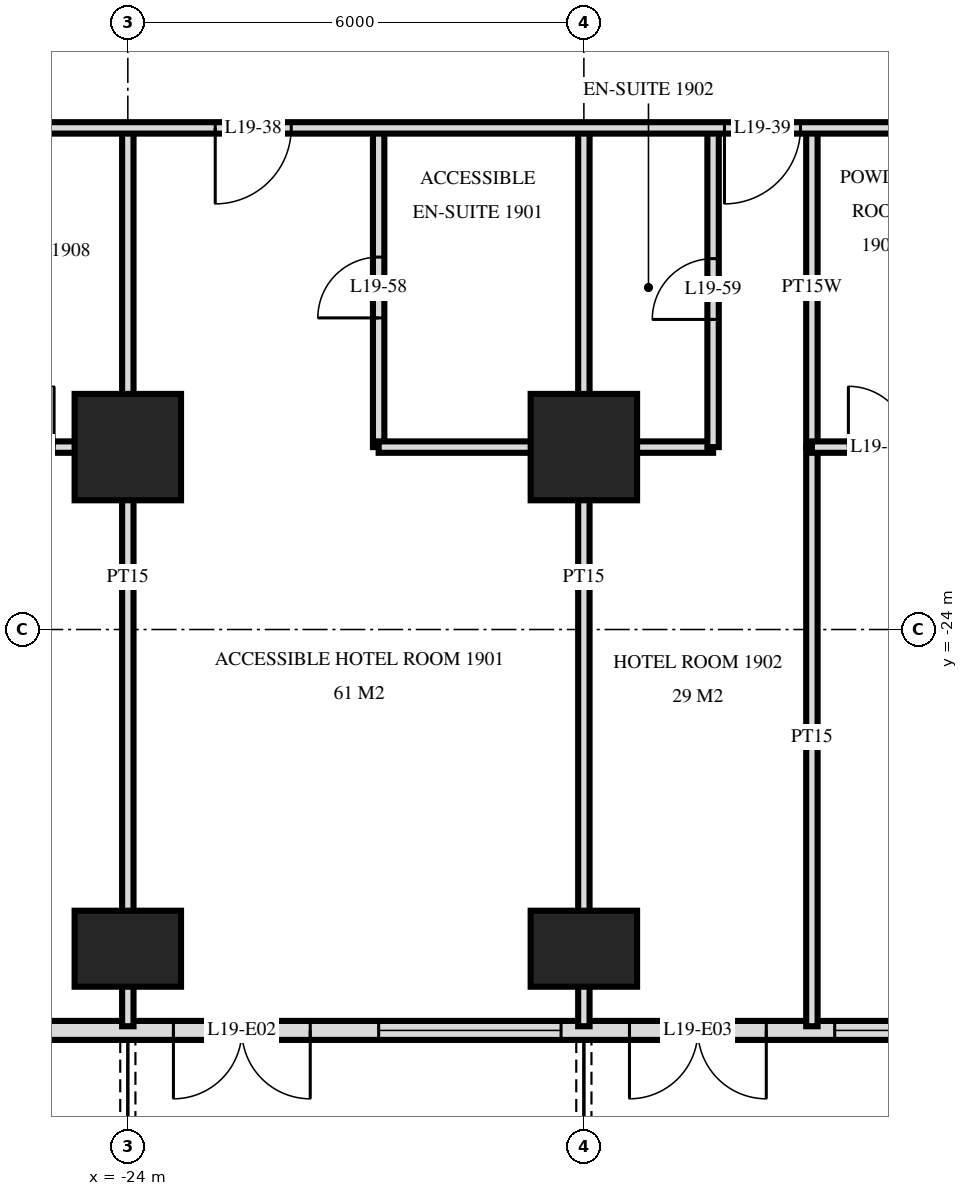
"""IFC4 building model, lengths in metres.
Left out: names, types, materials, properties, quantities, classifications, styles, units other than length and angle.
Written with IfcOpenShell. Run it as: python <this file> out.ifc"""

import sys

from ifc_helpers import new_model, si_unit, direction, frame, frame_2d, origin, origin_2d, place, context, subcontext, project, spatial, rectangle, extrude, element, fill, save


model = new_model("IFC4")
c1 = context("Model", 3, precision=1e-05, world=origin(), true_north=direction((0.0, 1.0)))
c2 = subcontext(c1, "Body", "Model", "MODEL_VIEW")
j1 = project(units=[si_unit("LENGTHUNIT", "METRE"), si_unit("PLANEANGLEUNIT", "RADIAN")], contexts=[c1])
p1 = place(None, origin())
s1 = spatial("IfcSite", under=j1, at=p1, CompositionType="ELEMENT")
p2 = place(p1, origin())
s2 = spatial("IfcBuilding", under=s1, at=p2, CompositionType="ELEMENT")
p3 = place(p2, frame((0.0, 0.0, 78.0)))
s3 = spatial("IfcBuildingStorey", under=s2, at=p3, CompositionType="ELEMENT", Elevation=78.0)
p4 = place(p3, frame((-24.0, -28.2, 0.0), z_axis=(0.0, 0.0, 1.0), x_axis=(1.0, 0.0, 0.0)))
e1 = element("IfcColumn", 1, at=p4, inside=s3, PredefinedType="COLUMN", context=c2, shape_type="SweptSolid", body=[
    extrude(rectangle(XDim=1.4, YDim=1.0, at=origin_2d()), origin(), (0.0, 0.0, 1.0), 3.6),
])
p5 = place(p3, frame((-24.0, -21.6, 0.0), z_axis=(0.0, 0.0, 1.0), x_axis=(1.0, 0.0, 0.0)))
e2 = element("IfcColumn", 2, at=p5, inside=s3, PredefinedType="COLUMN", context=c2, shape_type="SweptSolid", body=[
    extrude(rectangle(XDim=1.4, YDim=1.4, at=origin_2d()), origin(), (0.0, 0.0, 1.0), 3.6),
])
p6 = place(p3, frame((-18.0, -28.2, 0.0), z_axis=(0.0, 0.0, 1.0), x_axis=(1.0, 0.0, 0.0)))
e3 = element("IfcColumn", 3, at=p6, inside=s3, PredefinedType="COLUMN", context=c2, shape_type="SweptSolid", body=[
    extrude(rectangle(XDim=1.4, YDim=1.0, at=origin_2d()), origin(), (0.0, 0.0, 1.0), 3.6),
])
p7 = place(p3, frame((-18.0, -21.6, 0.0), z_axis=(0.0, 0.0, 1.0), x_axis=(1.0, 0.0, 0.0)))
e4 = element("IfcColumn", 4, at=p7, inside=s3, PredefinedType="COLUMN", context=c2, shape_type="SweptSolid", body=[
    extrude(rectangle(XDim=1.4, YDim=1.4, at=origin_2d()), origin(), (0.0, 0.0, 1.0), 3.6),
])
p8 = place(p3, frame((-28.775, -29.275, 0.0), z_axis=(0.0, 0.0, 1.0), x_axis=(1.0, 0.0, 0.0)))
e5 = element("IfcWall", 5, at=p8, inside=s3, PredefinedType="SOLIDWALL", context=c2, shape_type="SweptSolid", body=[
    extrude(rectangle(XDim=57.551, YDim=0.25, at=frame_2d((28.775, 0.0))), origin(), (0.0, 0.0, 1.0), 3.32),
])
p9 = place(p8, frame((0.575, 0.0, 0.0)))
e6 = element("IfcOpeningElement", 6, at=p9, cuts=e5, PredefinedType="OPENING", context=c2, shape_type="SweptSolid", body=[
    extrude(rectangle(XDim=1.8, YDim=2.4, at=frame_2d((0.9, 1.2))), frame((0.0, 0.135, 0.0), z_axis=(0.0, -1.0, 0.0), x_axis=(1.0, 0.0, 0.0)), (0.0, 0.0, 1.0), 0.27),
])
p10 = place(p8, frame((5.375, 0.0, 0.0)))
e7 = element("IfcOpeningElement", 7, at=p10, cuts=e5, PredefinedType="OPENING", context=c2, shape_type="SweptSolid", body=[
    extrude(rectangle(XDim=1.8, YDim=2.4, at=frame_2d((0.9, 1.2))), frame((0.0, 0.135, 0.0), z_axis=(0.0, -1.0, 0.0), x_axis=(1.0, 0.0, 0.0)), (0.0, 0.0, 1.0), 0.27),
])
p11 = place(p8, frame((8.075, 0.0, 0.3)))
e8 = element("IfcOpeningElement", 8, at=p11, cuts=e5, PredefinedType="OPENING", context=c2, shape_type="SweptSolid", body=[
    extrude(rectangle(XDim=2.4, YDim=2.1, at=frame_2d((1.2, 1.05))), frame((0.0, 0.135, 0.0), z_axis=(0.0, -1.0, 0.0), x_axis=(1.0, 0.0, 0.0)), (0.0, 0.0, 1.0), 0.27),
])
p12 = place(p8, frame((11.375, 0.0, 0.0)))
e9 = element("IfcOpeningElement", 9, at=p12, cuts=e5, PredefinedType="OPENING", context=c2, shape_type="SweptSolid", body=[
    extrude(rectangle(XDim=1.8, YDim=2.4, at=frame_2d((0.9, 1.2))), frame((0.0, 0.135, 0.0), z_axis=(0.0, -1.0, 0.0), x_axis=(1.0, 0.0, 0.0)), (0.0, 0.0, 1.0), 0.27),
])
p13 = place(p8, frame((14.075, 0.0, 0.3)))
e10 = element("IfcOpeningElement", 10, at=p13, cuts=e5, PredefinedType="OPENING", context=c2, shape_type="SweptSolid", body=[
    extrude(rectangle(XDim=2.4, YDim=2.1, at=frame_2d((1.2, 1.05))), frame((0.0, 0.135, 0.0), z_axis=(0.0, -1.0, 0.0), x_axis=(1.0, 0.0, 0.0)), (0.0, 0.0, 1.0), 0.27),
])
p14 = place(p8, frame((17.075, 0.0, 0.3)))
e11 = element("IfcOpeningElement", 11, at=p14, cuts=e5, PredefinedType="OPENING", context=c2, shape_type="SweptSolid", body=[
    extrude(rectangle(XDim=2.4, YDim=2.1, at=frame_2d((1.2, 1.05))), frame((0.0, 0.135, 0.0), z_axis=(0.0, -1.0, 0.0), x_axis=(1.0, 0.0, 0.0)), (0.0, 0.0, 1.0), 0.27),
])
p15 = place(p8, frame((20.375, 0.0, 0.0)))
e12 = element("IfcOpeningElement", 12, at=p15, cuts=e5, PredefinedType="OPENING", context=c2, shape_type="SweptSolid", body=[
    extrude(rectangle(XDim=1.8, YDim=2.4, at=frame_2d((0.9, 1.2))), frame((0.0, 0.135, 0.0), z_axis=(0.0, -1.0, 0.0), x_axis=(1.0, 0.0, 0.0)), (0.0, 0.0, 1.0), 0.27),
])
p16 = place(p8, frame((23.375, 0.0, 0.0)))
e13 = element("IfcOpeningElement", 13, at=p16, cuts=e5, PredefinedType="OPENING", context=c2, shape_type="SweptSolid", body=[
    extrude(rectangle(XDim=1.8, YDim=2.4, at=frame_2d((0.9, 1.2))), frame((0.0, 0.135, 0.0), z_axis=(0.0, -1.0, 0.0), x_axis=(1.0, 0.0, 0.0)), (0.0, 0.0, 1.0), 0.27),
])
p17 = place(p8, frame((26.075, 0.0, 0.3)))
e14 = element("IfcOpeningElement", 14, at=p17, cuts=e5, PredefinedType="OPENING", context=c2, shape_type="SweptSolid", body=[
    extrude(rectangle(XDim=2.4, YDim=2.1, at=frame_2d((1.2, 1.05))), frame((0.0, 0.135, 0.0), z_axis=(0.0, -1.0, 0.0), x_axis=(1.0, 0.0, 0.0)), (0.0, 0.0, 1.0), 0.27),
])
p18 = place(p8, frame((29.375, 0.0, 0.0)))
e15 = element("IfcOpeningElement", 15, at=p18, cuts=e5, PredefinedType="OPENING", context=c2, shape_type="SweptSolid", body=[
    extrude(rectangle(XDim=1.8, YDim=2.4, at=frame_2d((0.9, 1.2))), frame((0.0, 0.135, 0.0), z_axis=(0.0, -1.0, 0.0), x_axis=(1.0, 0.0, 0.0)), (0.0, 0.0, 1.0), 0.27),
])
p19 = place(p8, frame((32.075, 0.0, 0.3)))
e16 = element("IfcOpeningElement", 16, at=p19, cuts=e5, PredefinedType="OPENING", context=c2, shape_type="SweptSolid", body=[
    extrude(rectangle(XDim=2.4, YDim=2.1, at=frame_2d((1.2, 1.05))), frame((0.0, 0.135, 0.0), z_axis=(0.0, -1.0, 0.0), x_axis=(1.0, 0.0, 0.0)), (0.0, 0.0, 1.0), 0.27),
])
p20 = place(p8, frame((35.375, 0.0, 0.0)))
e17 = element("IfcOpeningElement", 17, at=p20, cuts=e5, PredefinedType="OPENING", context=c2, shape_type="SweptSolid", body=[
    extrude(rectangle(XDim=1.8, YDim=2.4, at=frame_2d((0.9, 1.2))), frame((0.0, 0.135, 0.0), z_axis=(0.0, -1.0, 0.0), x_axis=(1.0, 0.0, 0.0)), (0.0, 0.0, 1.0), 0.27),
])
p21 = place(p8, frame((38.075, 0.0, 0.3)))
e18 = element("IfcOpeningElement", 18, at=p21, cuts=e5, PredefinedType="OPENING", context=c2, shape_type="SweptSolid", body=[
    extrude(rectangle(XDim=2.4, YDim=2.1, at=frame_2d((1.2, 1.05))), frame((0.0, 0.135, 0.0), z_axis=(0.0, -1.0, 0.0), x_axis=(1.0, 0.0, 0.0)), (0.0, 0.0, 1.0), 0.27),
])
p22 = place(p8, frame((41.375, 0.0, 0.0)))
e19 = element("IfcOpeningElement", 19, at=p22, cuts=e5, PredefinedType="OPENING", context=c2, shape_type="SweptSolid", body=[
    extrude(rectangle(XDim=1.8, YDim=2.4, at=frame_2d((0.9, 1.2))), frame((0.0, 0.135, 0.0), z_axis=(0.0, -1.0, 0.0), x_axis=(1.0, 0.0, 0.0)), (0.0, 0.0, 1.0), 0.27),
])
p23 = place(p8, frame((44.075, 0.0, 0.3)))
e20 = element("IfcOpeningElement", 20, at=p23, cuts=e5, PredefinedType="OPENING", context=c2, shape_type="SweptSolid", body=[
    extrude(rectangle(XDim=2.4, YDim=2.1, at=frame_2d((1.2, 1.05))), frame((0.0, 0.135, 0.0), z_axis=(0.0, -1.0, 0.0), x_axis=(1.0, 0.0, 0.0)), (0.0, 0.0, 1.0), 0.27),
])
p24 = place(p8, frame((47.075, 0.0, 0.3)))
e21 = element("IfcOpeningElement", 21, at=p24, cuts=e5, PredefinedType="OPENING", context=c2, shape_type="SweptSolid", body=[
    extrude(rectangle(XDim=2.4, YDim=2.1, at=frame_2d((1.2, 1.05))), frame((0.0, 0.135, 0.0), z_axis=(0.0, -1.0, 0.0), x_axis=(1.0, 0.0, 0.0)), (0.0, 0.0, 1.0), 0.27),
])
p25 = place(p8, frame((50.375, 0.0, 0.0)))
e22 = element("IfcOpeningElement", 22, at=p25, cuts=e5, PredefinedType="OPENING", context=c2, shape_type="SweptSolid", body=[
    extrude(rectangle(XDim=1.8, YDim=2.4, at=frame_2d((0.9, 1.2))), frame((0.0, 0.135, 0.0), z_axis=(0.0, -1.0, 0.0), x_axis=(1.0, 0.0, 0.0)), (0.0, 0.0, 1.0), 0.27),
])
p26 = place(p8, frame((53.375, 0.0, 0.0)))
e23 = element("IfcOpeningElement", 23, at=p26, cuts=e5, PredefinedType="OPENING", context=c2, shape_type="SweptSolid", body=[
    extrude(rectangle(XDim=1.8, YDim=2.4, at=frame_2d((0.9, 1.2))), frame((0.0, 0.135, 0.0), z_axis=(0.0, -1.0, 0.0), x_axis=(1.0, 0.0, 0.0)), (0.0, 0.0, 1.0), 0.27),
])
p27 = place(p3, frame((-15.0, -29.22, 0.0), z_axis=(0.0, 0.0, 1.0), x_axis=(0.0, 1.0, 0.0)))
e24 = element("IfcWall", 24, at=p27, inside=s3, PredefinedType="PARTITIONING", context=c2, shape_type="SweptSolid", body=[
    extrude(rectangle(XDim=7.62, YDim=0.15, at=frame_2d((3.81, 0.0))), origin(), (0.0, 0.0, 1.0), 3.32),
])
p28 = place(p3, frame((-15.0, -21.6, 0.0), z_axis=(0.0, 0.0, 1.0), x_axis=(0.0, 1.0, 0.0)))
e25 = element("IfcWall", 25, at=p28, inside=s3, PredefinedType="PLUMBINGWALL", context=c2, shape_type="SweptSolid", body=[
    extrude(rectangle(XDim=4.2, YDim=0.15, at=frame_2d((2.1, 0.0))), origin(), (0.0, 0.0, 1.0), 3.32),
])
p29 = place(p3, frame((-16.3, -21.6, 0.0), z_axis=(0.0, 0.0, 1.0), x_axis=(0.0, 1.0, 0.0)))
e26 = element("IfcWall", 26, at=p29, inside=s3, PredefinedType="PARTITIONING", context=c2, shape_type="SweptSolid", body=[
    extrude(rectangle(XDim=4.2, YDim=0.15, at=frame_2d((2.1, 0.0))), origin(), (0.0, 0.0, 1.0), 3.32),
])
p30 = place(p29, frame((1.68, 0.0, 0.0)))
e27 = element("IfcOpeningElement", 27, at=p30, cuts=e26, PredefinedType="OPENING", context=c2, shape_type="SweptSolid", body=[
    extrude(rectangle(XDim=0.8, YDim=2.1, at=frame_2d((0.4, 1.05))), frame((0.0, 0.085, 0.0), z_axis=(0.0, -1.0, 0.0), x_axis=(1.0, 0.0, 0.0)), (0.0, 0.0, 1.0), 0.17),
])
p31 = place(p3, frame((-18.0, -29.22, 0.0), z_axis=(0.0, 0.0, 1.0), x_axis=(0.0, 1.0, 0.0)))
e28 = element("IfcWall", 28, at=p31, inside=s3, PredefinedType="PARTITIONING", context=c2, shape_type="SweptSolid", body=[
    extrude(rectangle(XDim=11.82, YDim=0.15, at=frame_2d((5.91, 0.0))), origin(), (0.0, 0.0, 1.0), 3.32),
])
p32 = place(p3, frame((-20.7, -21.6, 0.0), z_axis=(0.0, 0.0, 1.0), x_axis=(0.0, 1.0, 0.0)))
e29 = element("IfcWall", 29, at=p32, inside=s3, PredefinedType="PARTITIONING", context=c2, shape_type="SweptSolid", body=[
    extrude(rectangle(XDim=4.2, YDim=0.15, at=frame_2d((2.1, 0.0))), origin(), (0.0, 0.0, 1.0), 3.32),
])
p33 = place(p32, frame((1.7, 0.0, 0.0)))
e30 = element("IfcOpeningElement", 30, at=p33, cuts=e29, PredefinedType="OPENING", context=c2, shape_type="SweptSolid", body=[
    extrude(rectangle(XDim=0.8, YDim=2.1, at=frame_2d((0.4, 1.05))), frame((0.0, 0.085, 0.0), z_axis=(0.0, -1.0, 0.0), x_axis=(1.0, 0.0, 0.0)), (0.0, 0.0, 1.0), 0.17),
])
p34 = place(p3, frame((-24.0, -29.22, 0.0), z_axis=(0.0, 0.0, 1.0), x_axis=(0.0, 1.0, 0.0)))
e31 = element("IfcWall", 31, at=p34, inside=s3, PredefinedType="PARTITIONING", context=c2, shape_type="SweptSolid", body=[
    extrude(rectangle(XDim=11.82, YDim=0.15, at=frame_2d((5.91, 0.0))), origin(), (0.0, 0.0, 1.0), 3.32),
])
p35 = place(p3, frame((-28.2, -21.6, 0.0), z_axis=(0.0, 0.0, 1.0), x_axis=(1.0, 0.0, 0.0)))
e32 = element("IfcWall", 32, at=p35, inside=s3, PredefinedType="PARTITIONING", context=c2, shape_type="SweptSolid", body=[
    extrude(rectangle(XDim=4.2, YDim=0.15, at=frame_2d((2.1, 0.0))), origin(), (0.0, 0.0, 1.0), 3.32),
])
p36 = place(p35, frame((2.43, 0.0, 0.0)))
e33 = element("IfcOpeningElement", 33, at=p36, cuts=e32, PredefinedType="OPENING", context=c2, shape_type="SweptSolid", body=[
    extrude(rectangle(XDim=0.8, YDim=2.1, at=frame_2d((0.4, 1.05))), frame((0.0, 0.085, 0.0), z_axis=(0.0, -1.0, 0.0), x_axis=(1.0, 0.0, 0.0)), (0.0, 0.0, 1.0), 0.17),
])
p37 = place(p3, frame((-20.7, -21.6, 0.0), z_axis=(0.0, 0.0, 1.0), x_axis=(1.0, 0.0, 0.0)))
e34 = element("IfcWall", 34, at=p37, inside=s3, PredefinedType="PARTITIONING", context=c2, shape_type="SweptSolid", body=[
    extrude(rectangle(XDim=4.4, YDim=0.15, at=frame_2d((2.2, 0.0))), origin(), (0.0, 0.0, 1.0), 3.32),
])
p38 = place(p3, frame((-15.0, -21.6, 0.0), z_axis=(0.0, 0.0, 1.0), x_axis=(1.0, 0.0, 0.0)))
e35 = element("IfcWall", 35, at=p38, inside=s3, PredefinedType="PLUMBINGWALL", context=c2, shape_type="SweptSolid", body=[
    extrude(rectangle(XDim=1.8, YDim=0.15, at=frame_2d((0.9, 0.0))), origin(), (0.0, 0.0, 1.0), 3.32),
])
p39 = place(p38, frame((0.48, 0.0, 0.0)))
e36 = element("IfcOpeningElement", 36, at=p39, cuts=e35, PredefinedType="OPENING", context=c2, shape_type="SweptSolid", body=[
    extrude(rectangle(XDim=0.8, YDim=2.1, at=frame_2d((0.4, 1.05))), frame((0.0, 0.085, 0.0), z_axis=(0.0, -1.0, 0.0), x_axis=(1.0, 0.0, 0.0)), (0.0, 0.0, 1.0), 0.17),
])
p40 = place(p3, frame((-33.12, -17.4, 0.0), z_axis=(0.0, 0.0, 1.0), x_axis=(1.0, 0.0, 0.0)))
e37 = element("IfcWall", 37, at=p40, inside=s3, PredefinedType="PARTITIONING", context=c2, shape_type="SweptSolid", body=[
    extrude(rectangle(XDim=66.24, YDim=0.15, at=frame_2d((33.12, 0.0))), origin(), (0.0, 0.0, 1.0), 3.32),
])
p41 = place(p40, frame((10.27, 0.0, 0.0)))
e38 = element("IfcOpeningElement", 38, at=p41, cuts=e37, PredefinedType="OPENING", context=c2, shape_type="SweptSolid", body=[
    extrude(rectangle(XDim=1.0, YDim=2.1, at=frame_2d((0.5, 1.05))), frame((0.0, 0.085, 0.0), z_axis=(0.0, -1.0, 0.0), x_axis=(1.0, 0.0, 0.0)), (0.0, 0.0, 1.0), 0.17),
])
p42 = place(p40, frame((16.97, 0.0, 0.0)))
e39 = element("IfcOpeningElement", 39, at=p42, cuts=e37, PredefinedType="OPENING", context=c2, shape_type="SweptSolid", body=[
    extrude(rectangle(XDim=1.0, YDim=2.1, at=frame_2d((0.5, 1.05))), frame((0.0, 0.085, 0.0), z_axis=(0.0, -1.0, 0.0), x_axis=(1.0, 0.0, 0.0)), (0.0, 0.0, 1.0), 0.17),
])
p43 = place(p40, frame((28.42, 0.0, 0.0)))
e40 = element("IfcOpeningElement", 40, at=p43, cuts=e37, PredefinedType="OPENING", context=c2, shape_type="SweptSolid", body=[
    extrude(rectangle(XDim=1.0, YDim=2.1, at=frame_2d((0.5, 1.05))), frame((0.0, 0.085, 0.0), z_axis=(0.0, -1.0, 0.0), x_axis=(1.0, 0.0, 0.0)), (0.0, 0.0, 1.0), 0.17),
])
p44 = place(p40, frame((30.82, 0.0, 0.0)))
e41 = element("IfcOpeningElement", 41, at=p44, cuts=e37, PredefinedType="OPENING", context=c2, shape_type="SweptSolid", body=[
    extrude(rectangle(XDim=1.0, YDim=2.1, at=frame_2d((0.5, 1.05))), frame((0.0, 0.085, 0.0), z_axis=(0.0, -1.0, 0.0), x_axis=(1.0, 0.0, 0.0)), (0.0, 0.0, 1.0), 0.17),
])
p45 = place(p40, frame((39.27, 0.0, 0.0)))
e42 = element("IfcOpeningElement", 42, at=p45, cuts=e37, PredefinedType="OPENING", context=c2, shape_type="SweptSolid", body=[
    extrude(rectangle(XDim=1.0, YDim=2.1, at=frame_2d((0.5, 1.05))), frame((0.0, 0.085, 0.0), z_axis=(0.0, -1.0, 0.0), x_axis=(1.0, 0.0, 0.0)), (0.0, 0.0, 1.0), 0.17),
])
p46 = place(p40, frame((45.22, 0.0, 0.0)))
e43 = element("IfcOpeningElement", 43, at=p46, cuts=e37, PredefinedType="OPENING", context=c2, shape_type="SweptSolid", body=[
    extrude(rectangle(XDim=1.0, YDim=2.1, at=frame_2d((0.5, 1.05))), frame((0.0, 0.085, 0.0), z_axis=(0.0, -1.0, 0.0), x_axis=(1.0, 0.0, 0.0)), (0.0, 0.0, 1.0), 0.17),
])
p47 = place(p40, frame((48.27, 0.0, 0.0)))
e44 = element("IfcOpeningElement", 44, at=p47, cuts=e37, PredefinedType="OPENING", context=c2, shape_type="SweptSolid", body=[
    extrude(rectangle(XDim=1.0, YDim=2.1, at=frame_2d((0.5, 1.05))), frame((0.0, 0.085, 0.0), z_axis=(0.0, -1.0, 0.0), x_axis=(1.0, 0.0, 0.0)), (0.0, 0.0, 1.0), 0.17),
])
p48 = place(p40, frame((1.87, 0.0, 0.0)))
e45 = element("IfcOpeningElement", 45, at=p48, cuts=e37, PredefinedType="OPENING", context=c2, shape_type="SweptSolid", body=[
    extrude(rectangle(XDim=1.0, YDim=2.1, at=frame_2d((0.5, 1.05))), frame((0.0, 0.085, 0.0), z_axis=(0.0, -1.0, 0.0), x_axis=(1.0, 0.0, 0.0)), (0.0, 0.0, 1.0), 0.17),
])
p49 = place(p40, frame((60.37, 0.0, 0.0)))
e46 = element("IfcOpeningElement", 46, at=p49, cuts=e37, PredefinedType="OPENING", context=c2, shape_type="SweptSolid", body=[
    extrude(rectangle(XDim=1.0, YDim=2.1, at=frame_2d((0.5, 1.05))), frame((0.0, 0.085, 0.0), z_axis=(0.0, -1.0, 0.0), x_axis=(1.0, 0.0, 0.0)), (0.0, 0.0, 1.0), 0.17),
])
p50 = place(p10, frame((0.9, 0.0, 0.0), z_axis=(0.0, 0.0, 1.0), x_axis=(-1.0, 0.0, 0.0)))
e47 = element("IfcDoor", 47, at=p50, inside=s3, OperationType="DOUBLE_DOOR_SINGLE_SWING", PredefinedType="DOOR", context=c2, shape_type="SweptSolid", body=[
    extrude(rectangle(XDim=1.8, YDim=2.4, at=frame_2d((0.0, 1.2))), frame((0.0, -0.025, 0.0), z_axis=(0.0, 1.0, 0.0), x_axis=(-1.0, 0.0, 0.0)), (0.0, 0.0, 1.0), 0.05),
])
fill(e7, e47)
p51 = place(p11, origin())
e48 = element("IfcWindow", 48, at=p51, inside=s3, PartitioningType="SINGLE_PANEL", PredefinedType="WINDOW", context=c2, shape_type="SweptSolid", body=[
    extrude(rectangle(XDim=2.4, YDim=2.1, at=frame_2d((1.2, 1.05))), frame((0.0, 0.03, 0.0), z_axis=(0.0, -1.0, 0.0), x_axis=(1.0, 0.0, 0.0)), (0.0, 0.0, 1.0), 0.06),
])
fill(e8, e48)
p52 = place(p12, frame((0.9, 0.0, 0.0), z_axis=(0.0, 0.0, 1.0), x_axis=(-1.0, 0.0, 0.0)))
e49 = element("IfcDoor", 49, at=p52, inside=s3, OperationType="DOUBLE_DOOR_SINGLE_SWING", PredefinedType="DOOR", context=c2, shape_type="SweptSolid", body=[
    extrude(rectangle(XDim=1.8, YDim=2.4, at=frame_2d((0.0, 1.2))), frame((0.0, -0.025, 0.0), z_axis=(0.0, 1.0, 0.0), x_axis=(-1.0, 0.0, 0.0)), (0.0, 0.0, 1.0), 0.05),
])
fill(e9, e49)
p53 = place(p13, origin())
e50 = element("IfcWindow", 50, at=p53, inside=s3, PartitioningType="SINGLE_PANEL", PredefinedType="WINDOW", context=c2, shape_type="SweptSolid", body=[
    extrude(rectangle(XDim=2.4, YDim=2.1, at=frame_2d((1.2, 1.05))), frame((0.0, 0.03, 0.0), z_axis=(0.0, -1.0, 0.0), x_axis=(1.0, 0.0, 0.0)), (0.0, 0.0, 1.0), 0.06),
])
fill(e10, e50)
p54 = place(p41, frame((0.5, 0.0, 0.0), z_axis=(0.0, 0.0, 1.0), x_axis=(-1.0, 0.0, 0.0)))
e51 = element("IfcDoor", 51, at=p54, inside=s3, OperationType="SINGLE_SWING_LEFT", PredefinedType="DOOR", context=c2, shape_type="SweptSolid", body=[
    extrude(rectangle(XDim=1.0, YDim=2.1, at=frame_2d((0.0, 1.05))), frame((0.0, -0.025, 0.0), z_axis=(0.0, 1.0, 0.0), x_axis=(-1.0, 0.0, 0.0)), (0.0, 0.0, 1.0), 0.05),
])
fill(e38, e51)
p55 = place(p42, frame((0.5, 0.0, 0.0), z_axis=(0.0, 0.0, 1.0), x_axis=(-1.0, 0.0, 0.0)))
e52 = element("IfcDoor", 52, at=p55, inside=s3, OperationType="SINGLE_SWING_LEFT", PredefinedType="DOOR", context=c2, shape_type="SweptSolid", body=[
    extrude(rectangle(XDim=1.0, YDim=2.1, at=frame_2d((0.0, 1.05))), frame((0.0, -0.025, 0.0), z_axis=(0.0, 1.0, 0.0), x_axis=(-1.0, 0.0, 0.0)), (0.0, 0.0, 1.0), 0.05),
])
fill(e39, e52)
p56 = place(p33, origin())
e53 = element("IfcDoor", 53, at=p56, inside=s3, OperationType="SINGLE_SWING_RIGHT", PredefinedType="DOOR", context=c2, shape_type="SweptSolid", body=[
    extrude(rectangle(XDim=0.8, YDim=2.1, at=frame_2d((0.4, 1.05))), frame((0.0, 0.025, 0.0), z_axis=(0.0, -1.0, 0.0), x_axis=(1.0, 0.0, 0.0)), (0.0, 0.0, 1.0), 0.05),
])
fill(e30, e53)
p57 = place(p30, origin())
e54 = element("IfcDoor", 54, at=p57, inside=s3, OperationType="SINGLE_SWING_RIGHT", PredefinedType="DOOR", context=c2, shape_type="SweptSolid", body=[
    extrude(rectangle(XDim=0.8, YDim=2.1, at=frame_2d((0.4, 1.05))), frame((0.0, 0.025, 0.0), z_axis=(0.0, -1.0, 0.0), x_axis=(1.0, 0.0, 0.0)), (0.0, 0.0, 1.0), 0.05),
])
fill(e27, e54)
p58 = place(p39, origin())
e55 = element("IfcDoor", 55, at=p58, inside=s3, OperationType="SINGLE_SWING_RIGHT", PredefinedType="DOOR", context=c2, shape_type="SweptSolid", body=[
    extrude(rectangle(XDim=0.8, YDim=2.1, at=frame_2d((0.4, 1.05))), frame((0.0, 0.025, 0.0), z_axis=(0.0, -1.0, 0.0), x_axis=(1.0, 0.0, 0.0)), (0.0, 0.0, 1.0), 0.05),
])
fill(e36, e55)
p59 = place(p36, origin())
e56 = element("IfcDoor", 56, at=p59, inside=s3, OperationType="SINGLE_SWING_LEFT", PredefinedType="DOOR", context=c2, shape_type="SweptSolid", body=[
    extrude(rectangle(XDim=0.8, YDim=2.1, at=frame_2d((0.4, 1.05))), frame((0.0, 0.025, 0.0), z_axis=(0.0, -1.0, 0.0), x_axis=(1.0, 0.0, 0.0)), (0.0, 0.0, 1.0), 0.05),
])
fill(e33, e56)
save(model, sys.argv[1])
